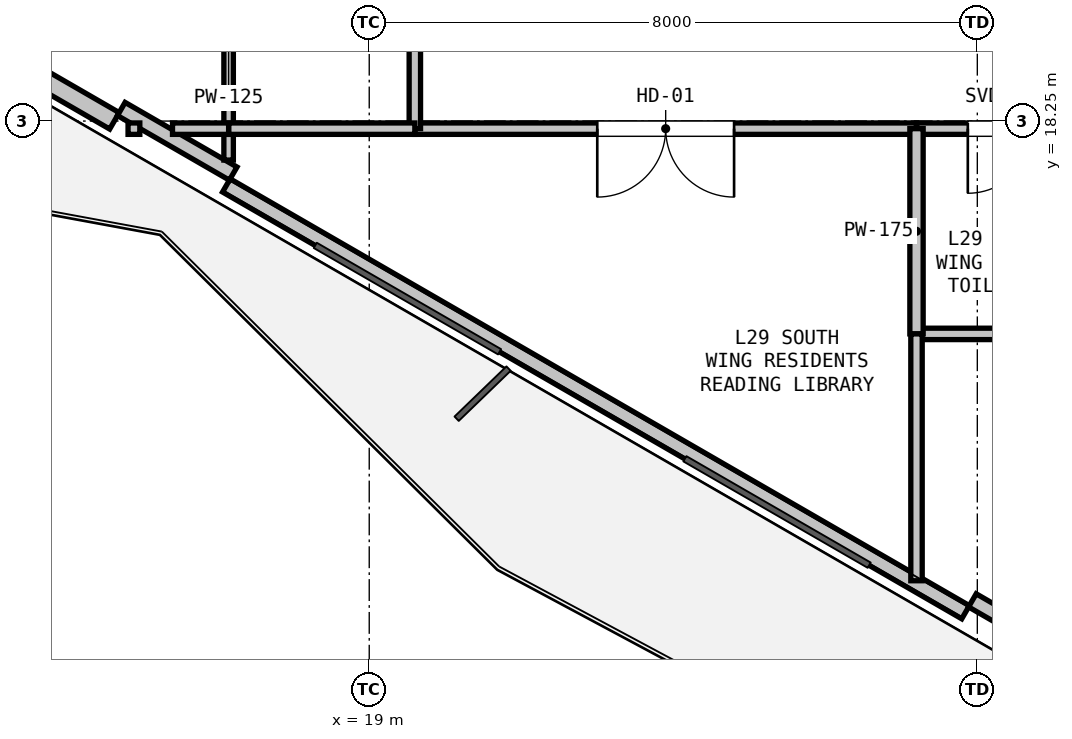
"""IFC4 building model, lengths in metres.
Left out: names, types, materials, properties, quantities, classifications, styles, units other than length and angle.
Written with IfcOpenShell. Run it as: python <this file> out.ifc"""

import sys

from ifc_helpers import new_model, si_unit, direction, frame, frame_2d, origin, place, context, subcontext, project, spatial, rectangle, extrude, element, fill, save


model = new_model("IFC4")
c1 = context("Model", 3, precision=1e-05, world=origin(), true_north=direction((0.0, 1.0)))
c2 = subcontext(c1, "Body", "Model", "MODEL_VIEW")
j1 = project(units=[si_unit("LENGTHUNIT", "METRE"), si_unit("PLANEANGLEUNIT", "RADIAN")], contexts=[c1])
p1 = place(None, origin())
s1 = spatial("IfcSite", under=j1, at=p1, CompositionType="ELEMENT")
p2 = place(p1, origin())
s2 = spatial("IfcBuilding", under=s1, at=p2, CompositionType="ELEMENT")
p3 = place(p2, frame((0.0, 0.0, 106.5)))
s3 = spatial("IfcBuildingStorey", under=s2, at=p3, CompositionType="ELEMENT", Elevation=106.5)
p4 = place(p3, frame((26.845, 11.788, 0.0), z_axis=(0.0, 0.0, 1.0), x_axis=(-0.866027010039, 0.499997217876, 0.0)))
e1 = element("IfcWall", 1, at=p4, inside=s3, PredefinedType="PARAPET", context=c2, shape_type="SweptSolid", body=[
    extrude(rectangle(XDim=11.229, YDim=0.2, at=frame_2d((5.615, 0.0))), origin(), (0.0, 0.0, 1.0), 0.2),
])
p5 = place(p3, frame((15.648, 18.253, 0.0), z_axis=(0.0, 0.0, 1.0), x_axis=(-0.866023023012, 0.500004123596, 0.0)))
e2 = element("IfcWall", 2, at=p5, inside=s3, PredefinedType="SOLIDWALL", context=c2, shape_type="SweptSolid", body=[
    extrude(rectangle(XDim=11.93, YDim=0.25, at=frame_2d((5.965, 0.0))), origin(), (0.0, 0.0, 1.0), 2.67),
])
p6 = place(p5, frame((1.706, 0.0, 0.9)))
e3 = element("IfcOpeningElement", 3, at=p6, cuts=e2, PredefinedType="OPENING", context=c2, shape_type="SweptSolid", body=[
    extrude(rectangle(XDim=1.2, YDim=1.4, at=frame_2d((0.6, 0.7))), frame((0.0, 0.135, 0.0), z_axis=(0.0, -1.0, 0.0), x_axis=(1.0, 0.0, 0.0)), (0.0, 0.0, 1.0), 0.27),
])
p7 = place(p3, frame((28.407, 11.094, 0.0), z_axis=(0.0, 0.0, 1.0), x_axis=(-0.86605165483, 0.499954529098, 0.0)))
e4 = element("IfcWall", 4, at=p7, inside=s3, PredefinedType="PARAPET", context=c2, shape_type="SweptSolid", body=[
    extrude(rectangle(XDim=1.7, YDim=0.2, at=frame_2d((0.85, 0.0))), origin(), (0.0, 0.0, 1.0), 2.67),
])
p8 = place(p3, frame((17.21, 17.559, 0.0), z_axis=(0.0, 0.0, 1.0), x_axis=(-0.866025371046, 0.500000056704, 0.0)))
e5 = element("IfcWall", 5, at=p8, inside=s3, PredefinedType="PARAPET", context=c2, shape_type="SweptSolid", body=[
    extrude(rectangle(XDim=1.7, YDim=0.2, at=frame_2d((0.85, 0.0))), origin(), (0.0, 0.0, 1.0), 2.67),
])
p9 = place(p3, frame((28.4, 18.15, 0.0), z_axis=(0.0, 0.0, 1.0), x_axis=(-1.0, 0.0, 0.0)))
e6 = element("IfcWall", 6, at=p9, inside=s3, PredefinedType="PARTITIONING", context=c2, shape_type="SweptSolid", body=[
    extrude(rectangle(XDim=2.2, YDim=0.15, at=frame_2d((1.1, 0.0))), origin(), (0.0, 0.0, 1.0), 3.05),
])
p10 = place(p9, frame((0.675, 0.0, 0.0)))
e7 = element("IfcOpeningElement", 7, at=p10, cuts=e6, PredefinedType="OPENING", context=c2, shape_type="SweptSolid", body=[
    extrude(rectangle(XDim=0.85, YDim=2.1, at=frame_2d((0.425, 1.05))), frame((0.0, 0.085, 0.0), z_axis=(0.0, -1.0, 0.0), x_axis=(1.0, 0.0, 0.0)), (0.0, 0.0, 1.0), 0.17),
])
p11 = place(p3, frame((26.2, 18.15, 0.0), z_axis=(0.0, 0.0, 1.0), x_axis=(-1.0, 0.0, 0.0)))
e8 = element("IfcWall", 8, at=p11, inside=s3, PredefinedType="PARTITIONING", context=c2, shape_type="SweptSolid", body=[
    extrude(rectangle(XDim=6.6, YDim=0.15, at=frame_2d((3.3, 0.0))), origin(), (0.0, 0.0, 1.0), 2.423),
])
p12 = place(p11, frame((2.4, 0.0, 0.0)))
e9 = element("IfcOpeningElement", 9, at=p12, cuts=e8, PredefinedType="OPENING", context=c2, shape_type="SweptSolid", body=[
    extrude(rectangle(XDim=1.8, YDim=2.2, at=frame_2d((0.9, 1.1))), frame((0.0, 0.085, 0.0), z_axis=(0.0, -1.0, 0.0), x_axis=(1.0, 0.0, 0.0)), (0.0, 0.0, 1.0), 0.17),
])
p13 = place(p3, frame((19.6, 18.15, 0.0), z_axis=(0.0, 0.0, 1.0), x_axis=(0.0, 1.0, 0.0)))
e10 = element("IfcWall", 10, at=p13, inside=s3, PredefinedType="PARTITIONING", context=c2, shape_type="SweptSolid", body=[
    extrude(rectangle(XDim=3.9, YDim=0.15, at=frame_2d((1.95, 0.0))), origin(), (0.0, 0.0, 1.0), 2.423),
])
p14 = place(p3, frame((28.4, 15.45, 0.0), z_axis=(0.0, 0.0, 1.0), x_axis=(-1.0, 0.0, 0.0)))
e11 = element("IfcWall", 11, at=p14, inside=s3, PredefinedType="PARTITIONING", context=c2, shape_type="SweptSolid", body=[
    extrude(rectangle(XDim=2.2, YDim=0.15, at=frame_2d((1.1, 0.0))), origin(), (0.0, 0.0, 1.0), 2.423),
])
p15 = place(p3, frame((26.2, 15.45, 0.0), z_axis=(0.0, 0.0, 1.0), x_axis=(0.0, 1.0, 0.0)))
e12 = element("IfcWall", 12, at=p15, inside=s3, PredefinedType="PLUMBINGWALL", context=c2, shape_type="SweptSolid", body=[
    extrude(rectangle(XDim=2.7, YDim=0.175, at=frame_2d((1.35, 0.0))), origin(), (0.0, 0.0, 1.0), 2.423),
])
p16 = place(p3, frame((17.15, 17.737, 0.0), z_axis=(0.0, 0.0, 1.0), x_axis=(0.0, 1.0, 0.0)))
e13 = element("IfcWall", 13, at=p16, inside=s3, PredefinedType="PARTITIONING", context=c2, shape_type="SweptSolid", body=[
    extrude(rectangle(XDim=3.063, YDim=0.125, at=frame_2d((1.532, 0.0))), origin(), (0.0, 0.0, 1.0), 2.365),
])
p17 = place(p3, frame((19.6, 18.15, 0.0), z_axis=(0.0, 0.0, 1.0), x_axis=(-1.0, 0.0, 0.0)))
e14 = element("IfcWall", 14, at=p17, inside=s3, PredefinedType="PARTITIONING", context=c2, shape_type="SweptSolid", body=[
    extrude(rectangle(XDim=2.45, YDim=0.15, at=frame_2d((1.225, 0.0))), origin(), (0.0, 0.0, 1.0), 2.365),
])
p18 = place(p3, frame((15.827, 18.15, 0.0), z_axis=(0.0, 0.0, 1.0), x_axis=(1.0, 0.0, 0.0)))
e15 = element("IfcWall", 15, at=p18, inside=s3, PredefinedType="PARTITIONING", context=c2, shape_type="SweptSolid", body=[
    extrude(rectangle(XDim=0.155, YDim=0.15, at=frame_2d((0.077, 0.0))), origin(), (0.0, 0.0, 1.0), 3.05),
])
p19 = place(p3, frame((16.412, 18.15, 0.0), z_axis=(0.0, 0.0, 1.0), x_axis=(1.0, 0.0, 0.0)))
e16 = element("IfcWall", 16, at=p19, inside=s3, PredefinedType="PARTITIONING", context=c2, shape_type="SweptSolid", body=[
    extrude(rectangle(XDim=0.738, YDim=0.15, at=frame_2d((0.369, 0.0))), origin(), (0.0, 0.0, 1.0), 2.365),
])
p20 = place(p3, frame((26.2, 15.45, 0.0), z_axis=(0.0, 0.0, 1.0), x_axis=(0.0, -1.0, 0.0)))
e17 = element("IfcWall", 17, at=p20, inside=s3, PredefinedType="PARTITIONING", context=c2, shape_type="SweptSolid", body=[
    extrude(rectangle(XDim=3.248, YDim=0.15, at=frame_2d((1.624, 0.0))), origin(), (0.0, 0.0, 1.0), 2.365),
])
p21 = place(p10, origin())
e18 = element("IfcDoor", 18, at=p21, inside=s3, OperationType="SINGLE_SWING_RIGHT", PredefinedType="DOOR", context=c2, shape_type="SweptSolid", body=[
    extrude(rectangle(XDim=0.85, YDim=2.1, at=frame_2d((0.425, 1.05))), frame((0.0, 0.025, 0.0), z_axis=(0.0, -1.0, 0.0), x_axis=(1.0, 0.0, 0.0)), (0.0, 0.0, 1.0), 0.05),
])
fill(e7, e18)
p22 = place(p12, origin())
e19 = element("IfcDoor", 19, at=p22, inside=s3, OperationType="DOUBLE_DOOR_SINGLE_SWING", PredefinedType="DOOR", context=c2, shape_type="SweptSolid", body=[
    extrude(rectangle(XDim=1.8, YDim=2.2, at=frame_2d((0.9, 1.1))), frame((0.0, 0.025, 0.0), z_axis=(0.0, -1.0, 0.0), x_axis=(1.0, 0.0, 0.0)), (0.0, 0.0, 1.0), 0.05),
])
fill(e9, e19)
save(model, sys.argv[1])
